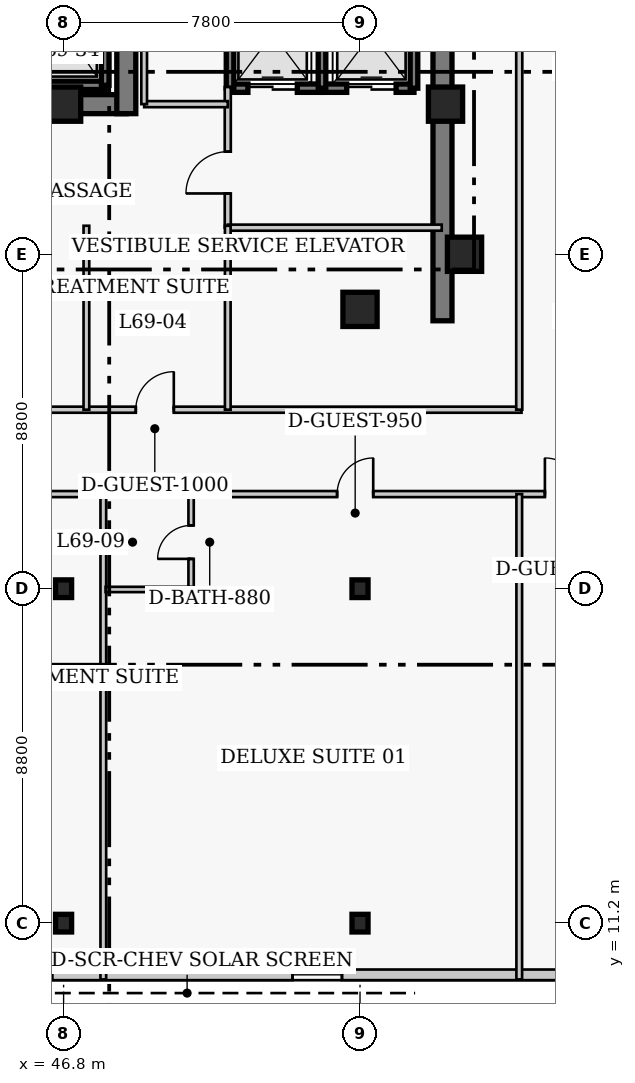
"""IFC4 building model, lengths in metres.
Left out: names, types, materials, properties, quantities, classifications, styles, units other than length and angle.
Written with IfcOpenShell. Run it as: python <this file> out.ifc"""

import sys

from ifc_helpers import new_model, si_unit, direction, frame, frame_2d, origin, origin_2d, place, context, subcontext, project, spatial, rectangle, i_section, extrude, element, fill, save


model = new_model("IFC4")
c1 = context("Model", 3, precision=1e-05, world=origin(), true_north=direction((0.0, 1.0)))
c2 = subcontext(c1, "Body", "Model", "MODEL_VIEW")
j1 = project(units=[si_unit("LENGTHUNIT", "METRE"), si_unit("PLANEANGLEUNIT", "RADIAN")], contexts=[c1])
p1 = place(None, origin())
s1 = spatial("IfcSite", under=j1, at=p1, CompositionType="ELEMENT")
p2 = place(p1, origin())
s2 = spatial("IfcBuilding", under=s1, at=p2, CompositionType="ELEMENT")
p3 = place(p2, frame((0.0, 0.0, 277.4)))
s3 = spatial("IfcBuildingStorey", under=s2, at=p3, CompositionType="ELEMENT", Elevation=277.4)
p4 = place(p3, frame((56.77, 27.05, 0.0), z_axis=(0.0, 0.0, 1.0), x_axis=(0.0, 1.0, 0.0)))
e1 = element("IfcWall", 1, at=p4, inside=s3, PredefinedType="SHEAR", context=c2, shape_type="SweptSolid", body=[
    extrude(rectangle(XDim=13.52, YDim=0.5, at=frame_2d((6.76, 0.0))), origin(), (0.0, 0.0, 1.0), 4.0),
])
p5 = place(p3, frame((45.81, 32.75, 0.0), z_axis=(0.0, 0.0, 1.0), x_axis=(1.0, 0.0, 0.0)))
e2 = element("IfcWall", 2, at=p5, inside=s3, PredefinedType="SHEAR", context=c2, shape_type="SweptSolid", body=[
    extrude(rectangle(XDim=2.64, YDim=0.5, at=frame_2d((1.32, 0.0))), origin(), (0.0, 0.0, 1.0), 4.0),
])
p6 = place(p3, frame((48.45, 32.5, 0.0), z_axis=(0.0, 0.0, 1.0), x_axis=(0.0, 1.0, 0.0)))
e3 = element("IfcWall", 3, at=p6, inside=s3, PredefinedType="SHEAR", context=c2, shape_type="SweptSolid", body=[
    extrude(rectangle(XDim=7.82, YDim=0.5, at=frame_2d((3.91, 0.0))), origin(), (0.0, 0.0, 1.0), 4.0),
])
p7 = place(p6, frame((5.7, 0.0, 0.0)))
e4 = element("IfcOpeningElement", 4, at=p7, cuts=e3, PredefinedType="OPENING", context=c2, shape_type="SweptSolid", body=[
    extrude(rectangle(XDim=1.1, YDim=2.15, at=frame_2d((0.55, 1.075))), frame((0.0, 0.26, 0.0), z_axis=(0.0, -1.0, 0.0), x_axis=(1.0, 0.0, 0.0)), (0.0, 0.0, 1.0), 0.52),
])
for number, where, z_axis, x_axis in (
    (5, (46.8, 11.2, 0.0), (0.0, 0.0, 1.0), (1.0, 0.0, 0.0)),
    (6, (46.8, 20.0, 0.0), (0.0, 0.0, 1.0), (1.0, 0.0, 0.0)),
    (7, (54.6, 11.2, 0.0), (0.0, 0.0, 1.0), (1.0, 0.0, 0.0)),
    (8, (54.6, 20.0, 0.0), (0.0, 0.0, 1.0), (1.0, 0.0, 0.0)),
):
    element("IfcColumn", number, at=place(p3, frame(where, z_axis=z_axis, x_axis=x_axis)), inside=s3, PredefinedType="COLUMN", context=c2, shape_type="SweptSolid", body=[
        extrude(i_section(OverallWidth=0.422, OverallDepth=0.465, WebThickness=0.045, FlangeThickness=0.073, FilletRadius=0.017, at=origin_2d()), origin(), (0.0, 0.0, 1.0), 4.0),
    ])
for number, where, z_axis, x_axis in (
    (9, (57.35, 28.8, 0.0), (0.0, 0.0, 1.0), (1.0, 0.0, 0.0)),
    (10, (46.8, 32.75, 0.0), (0.0, 0.0, 1.0), (1.0, 0.0, 0.0)),
    (11, (54.6, 27.35, 0.0), (0.0, 0.0, 1.0), (1.0, 0.0, 0.0)),
    (12, (56.85, 32.75, 0.0), (0.0, 0.0, 1.0), (1.0, 0.0, 0.0)),
):
    element("IfcColumn", number, at=place(p3, frame(where, z_axis=z_axis, x_axis=x_axis)), inside=s3, PredefinedType="COLUMN", context=c2, shape_type="SweptSolid", body=[
        extrude(rectangle(XDim=0.9, YDim=0.9, at=origin_2d()), origin(), (0.0, 0.0, 1.0), 4.0),
    ])
p8 = place(p3, frame((41.71, 9.84, 0.0), z_axis=(0.0, 0.0, 1.0), x_axis=(1.0, 0.0, 0.0)))
e13 = element("IfcWall", 13, at=p8, inside=s3, PredefinedType="SOLIDWALL", context=c2, shape_type="SweptSolid", body=[
    extrude(rectangle(XDim=24.83, YDim=0.28, at=frame_2d((12.415, 0.0))), origin(), (0.0, 0.0, 1.0), 3.76),
])
p9 = place(p8, frame((3.488, 0.0, 0.85)))
e14 = element("IfcOpeningElement", 14, at=p9, cuts=e13, PredefinedType="OPENING", context=c2, shape_type="SweptSolid", body=[
    extrude(rectangle(XDim=1.3, YDim=1.7, at=frame_2d((0.65, 0.85))), frame((0.0, 0.15, 0.0), z_axis=(0.0, -1.0, 0.0), x_axis=(1.0, 0.0, 0.0)), (0.0, 0.0, 1.0), 0.3),
])
p10 = place(p8, frame((11.115, 0.0, 0.85)))
e15 = element("IfcOpeningElement", 15, at=p10, cuts=e13, PredefinedType="OPENING", context=c2, shape_type="SweptSolid", body=[
    extrude(rectangle(XDim=1.3, YDim=1.7, at=frame_2d((0.65, 0.85))), frame((0.0, 0.15, 0.0), z_axis=(0.0, -1.0, 0.0), x_axis=(1.0, 0.0, 0.0)), (0.0, 0.0, 1.0), 0.3),
])
p11 = place(p8, frame((18.892, 0.0, 0.85)))
e16 = element("IfcOpeningElement", 16, at=p11, cuts=e13, PredefinedType="OPENING", context=c2, shape_type="SweptSolid", body=[
    extrude(rectangle(XDim=1.3, YDim=1.7, at=frame_2d((0.65, 0.85))), frame((0.0, 0.15, 0.0), z_axis=(0.0, -1.0, 0.0), x_axis=(1.0, 0.0, 0.0)), (0.0, 0.0, 1.0), 0.3),
])
p12 = place(p3, frame((51.18, 33.17, 0.0), z_axis=(0.0, 0.0, 1.0), x_axis=(1.0, 0.0, 0.0)))
e17 = element("IfcWall", 17, at=p12, inside=s3, PredefinedType="SHEAR", context=c2, shape_type="SweptSolid", body=[
    extrude(rectangle(XDim=2.42, YDim=0.22, at=frame_2d((1.21, 0.0))), origin(), (0.0, 0.0, 1.0), 4.0),
])
p13 = place(p12, frame((0.47, 0.0, 0.0)))
e18 = element("IfcOpeningElement", 18, at=p13, cuts=e17, PredefinedType="OPENING", context=c2, shape_type="SweptSolid", body=[
    extrude(rectangle(XDim=1.3, YDim=2.15, at=frame_2d((0.65, 1.075))), frame((0.0, 0.12, 0.0), z_axis=(0.0, -1.0, 0.0), x_axis=(1.0, 0.0, 0.0)), (0.0, 0.0, 1.0), 0.24),
])
p14 = place(p3, frame((51.18, 33.17, 0.0), z_axis=(0.0, 0.0, 1.0), x_axis=(0.0, 1.0, 0.0)))
e19 = element("IfcWall", 19, at=p14, inside=s3, PredefinedType="SHEAR", context=c2, shape_type="SweptSolid", body=[
    extrude(rectangle(XDim=2.86, YDim=0.2, at=frame_2d((1.43, 0.0))), origin(), (0.0, 0.0, 1.0), 4.0),
])
p15 = place(p3, frame((53.6, 33.17, 0.0), z_axis=(0.0, 0.0, 1.0), x_axis=(1.0, 0.0, 0.0)))
e20 = element("IfcWall", 20, at=p15, inside=s3, PredefinedType="SHEAR", context=c2, shape_type="SweptSolid", body=[
    extrude(rectangle(XDim=2.42, YDim=0.22, at=frame_2d((1.21, 0.0))), origin(), (0.0, 0.0, 1.0), 4.0),
])
p16 = place(p15, frame((0.65, 0.0, 0.0)))
e21 = element("IfcOpeningElement", 21, at=p16, cuts=e20, PredefinedType="OPENING", context=c2, shape_type="SweptSolid", body=[
    extrude(rectangle(XDim=1.3, YDim=2.15, at=frame_2d((0.65, 1.075))), frame((0.0, 0.12, 0.0), z_axis=(0.0, -1.0, 0.0), x_axis=(1.0, 0.0, 0.0)), (0.0, 0.0, 1.0), 0.24),
])
for number, where, z_axis, x_axis in (
    (22, (53.6, 33.17, 0.0), (0.0, 0.0, 1.0), (0.0, 1.0, 0.0)),
    (23, (56.02, 33.17, 0.0), (0.0, 0.0, 1.0), (0.0, 1.0, 0.0)),
):
    element("IfcWall", number, at=place(p3, frame(where, z_axis=z_axis, x_axis=x_axis)), inside=s3, PredefinedType="SHEAR", context=c2, shape_type="SweptSolid", body=[
        extrude(rectangle(XDim=2.86, YDim=0.2, at=frame_2d((1.43, 0.0))), origin(), (0.0, 0.0, 1.0), 4.0),
    ])
p17 = place(p3, frame((45.805, 33.245, 0.0), z_axis=(0.0, 0.0, 1.0), x_axis=(1.0, 0.0, 0.0)))
e24 = element("IfcWall", 24, at=p17, inside=s3, PredefinedType="SHEAR", context=c2, shape_type="SweptSolid", body=[
    extrude(rectangle(XDim=2.09, YDim=0.22, at=frame_2d((1.045, 0.0))), origin(), (0.0, 0.0, 1.0), 4.0),
])
p18 = place(p3, frame((47.895, 33.245, 0.0), z_axis=(0.0, 0.0, 1.0), x_axis=(0.0, 1.0, 0.0)))
e25 = element("IfcWall", 25, at=p18, inside=s3, PredefinedType="SHEAR", context=c2, shape_type="SweptSolid", body=[
    extrude(rectangle(XDim=2.91, YDim=0.2, at=frame_2d((1.455, 0.0))), origin(), (0.0, 0.0, 1.0), 4.0),
])
p19 = place(p3, frame((51.12, 29.5, 0.0), z_axis=(0.0, 0.0, 1.0), x_axis=(0.0, 1.0, 0.0)))
e26 = element("IfcWall", 26, at=p19, inside=s3, PredefinedType="PARTITIONING", context=c2, shape_type="SweptSolid", body=[
    extrude(rectangle(XDim=3.7, YDim=0.16, at=frame_2d((1.85, 0.0))), origin(), (0.0, 0.0, 1.0), 3.76),
])
p20 = place(p19, frame((0.9, 0.0, 0.0)))
e27 = element("IfcOpeningElement", 27, at=p20, cuts=e26, PredefinedType="OPENING", context=c2, shape_type="SweptSolid", body=[
    extrude(rectangle(XDim=1.1, YDim=2.15, at=frame_2d((0.55, 1.075))), frame((0.0, 0.09, 0.0), z_axis=(0.0, -1.0, 0.0), x_axis=(1.0, 0.0, 0.0)), (0.0, 0.0, 1.0), 0.18),
])
p21 = place(p3, frame((51.12, 29.5, 0.0), z_axis=(0.0, 0.0, 1.0), x_axis=(1.0, 0.0, 0.0)))
e28 = element("IfcWall", 28, at=p21, inside=s3, PredefinedType="PARTITIONING", context=c2, shape_type="SweptSolid", body=[
    extrude(rectangle(XDim=5.63, YDim=0.16, at=frame_2d((2.815, 0.0))), origin(), (0.0, 0.0, 1.0), 3.76),
])
p22 = place(p3, frame((48.92, 32.75, 0.0), z_axis=(0.0, 0.0, 1.0), x_axis=(1.0, 0.0, 0.0)))
e29 = element("IfcWall", 29, at=p22, inside=s3, PredefinedType="PARTITIONING", context=c2, shape_type="SweptSolid", body=[
    extrude(rectangle(XDim=2.2, YDim=0.16, at=frame_2d((1.1, 0.0))), origin(), (0.0, 0.0, 1.0), 3.76),
])
p23 = place(p3, frame((48.92, 32.75, 0.0), z_axis=(0.0, 0.0, 1.0), x_axis=(0.0, 1.0, 0.0)))
e30 = element("IfcWall", 30, at=p23, inside=s3, PredefinedType="PARTITIONING", context=c2, shape_type="SweptSolid", body=[
    extrude(rectangle(XDim=3.62, YDim=0.15, at=frame_2d((1.81, 0.0))), origin(), (0.0, 0.0, 1.0), 3.76),
])
p24 = place(p3, frame((35.85, 24.71, 0.0), z_axis=(0.0, 0.0, 1.0), x_axis=(1.0, 0.0, 0.0)))
e31 = element("IfcWall", 31, at=p24, inside=s3, PredefinedType="PARTITIONING", context=c2, shape_type="SweptSolid", body=[
    extrude(rectangle(XDim=23.0, YDim=0.16, at=frame_2d((11.5, 0.0))), origin(), (0.0, 0.0, 1.0), 3.76),
])
p25 = place(p24, frame((5.35, 0.0, 0.0)))
e32 = element("IfcOpeningElement", 32, at=p25, cuts=e31, PredefinedType="OPENING", context=c2, shape_type="SweptSolid", body=[
    extrude(rectangle(XDim=1.0, YDim=2.15, at=frame_2d((0.5, 1.075))), frame((0.0, 0.09, 0.0), z_axis=(0.0, -1.0, 0.0), x_axis=(1.0, 0.0, 0.0)), (0.0, 0.0, 1.0), 0.18),
])
p26 = place(p24, frame((12.85, 0.0, 0.0)))
e33 = element("IfcOpeningElement", 33, at=p26, cuts=e31, PredefinedType="OPENING", context=c2, shape_type="SweptSolid", body=[
    extrude(rectangle(XDim=1.0, YDim=2.15, at=frame_2d((0.5, 1.075))), frame((0.0, 0.09, 0.0), z_axis=(0.0, -1.0, 0.0), x_axis=(1.0, 0.0, 0.0)), (0.0, 0.0, 1.0), 0.18),
])
p27 = place(p3, frame((35.8, 22.49, 0.0), z_axis=(0.0, 0.0, 1.0), x_axis=(1.0, 0.0, 0.0)))
e34 = element("IfcWall", 34, at=p27, inside=s3, PredefinedType="PARTITIONING", context=c2, shape_type="SweptSolid", body=[
    extrude(rectangle(XDim=25.21, YDim=0.16, at=frame_2d((12.605, 0.0))), origin(), (0.0, 0.0, 1.0), 3.76),
])
p28 = place(p27, frame((5.522, 0.0, 0.0)))
e35 = element("IfcOpeningElement", 35, at=p28, cuts=e34, PredefinedType="OPENING", context=c2, shape_type="SweptSolid", body=[
    extrude(rectangle(XDim=1.0, YDim=2.15, at=frame_2d((0.5, 1.075))), frame((0.0, 0.09, 0.0), z_axis=(0.0, -1.0, 0.0), x_axis=(1.0, 0.0, 0.0)), (0.0, 0.0, 1.0), 0.18),
])
p29 = place(p27, frame((18.198, 0.0, 0.0)))
e36 = element("IfcOpeningElement", 36, at=p29, cuts=e34, PredefinedType="OPENING", context=c2, shape_type="SweptSolid", body=[
    extrude(rectangle(XDim=0.95, YDim=2.1, at=frame_2d((0.475, 1.05))), frame((0.0, 0.09, 0.0), z_axis=(0.0, -1.0, 0.0), x_axis=(1.0, 0.0, 0.0)), (0.0, 0.0, 1.0), 0.18),
])
p30 = place(p27, frame((23.665, 0.0, 0.0)))
e37 = element("IfcOpeningElement", 37, at=p30, cuts=e34, PredefinedType="OPENING", context=c2, shape_type="SweptSolid", body=[
    extrude(rectangle(XDim=0.95, YDim=2.1, at=frame_2d((0.475, 1.05))), frame((0.0, 0.09, 0.0), z_axis=(0.0, -1.0, 0.0), x_axis=(1.0, 0.0, 0.0)), (0.0, 0.0, 1.0), 0.18),
])
p31 = place(p3, frame((58.79, 24.71, 0.0), z_axis=(0.0, 0.0, 1.0), x_axis=(0.0, 1.0, 0.0)))
e38 = element("IfcWall", 38, at=p31, inside=s3, PredefinedType="PARTITIONING", context=c2, shape_type="SweptSolid", body=[
    extrude(rectangle(XDim=15.94, YDim=0.16, at=frame_2d((7.97, 0.0))), origin(), (0.0, 0.0, 1.0), 3.76),
])
for number, where, z_axis, x_axis in (
    (39, (47.4, 24.71, 0.0), (0.0, 0.0, 1.0), (0.0, 1.0, 0.0)),
    (40, (51.12, 24.71, 0.0), (0.0, 0.0, 1.0), (0.0, 1.0, 0.0)),
):
    element("IfcWall", number, at=place(p3, frame(where, z_axis=z_axis, x_axis=x_axis)), inside=s3, PredefinedType="PARTITIONING", context=c2, shape_type="SweptSolid", body=[
        extrude(rectangle(XDim=4.84, YDim=0.15, at=frame_2d((2.42, 0.0))), origin(), (0.0, 0.0, 1.0), 3.76),
    ])
p32 = place(p3, frame((47.845, 9.72, 0.0), z_axis=(0.0, 0.0, 1.0), x_axis=(0.0, 1.0, 0.0)))
e41 = element("IfcWall", 41, at=p32, inside=s3, PredefinedType="PARTITIONING", context=c2, shape_type="SweptSolid", body=[
    extrude(rectangle(XDim=12.77, YDim=0.15, at=frame_2d((6.385, 0.0))), origin(), (0.0, 0.0, 1.0), 3.76),
])
p33 = place(p3, frame((50.155, 19.98, 0.0), z_axis=(0.0, 0.0, 1.0), x_axis=(0.0, 1.0, 0.0)))
e42 = element("IfcWall", 42, at=p33, inside=s3, PredefinedType="PLUMBINGWALL", context=c2, shape_type="SweptSolid", body=[
    extrude(rectangle(XDim=2.49, YDim=0.14, at=frame_2d((1.245, 0.0))), origin(), (0.0, 0.0, 1.0), 3.76),
])
p34 = place(p33, frame((0.805, 0.0, 0.0)))
e43 = element("IfcOpeningElement", 43, at=p34, cuts=e42, PredefinedType="OPENING", context=c2, shape_type="SweptSolid", body=[
    extrude(rectangle(XDim=0.88, YDim=2.05, at=frame_2d((0.44, 1.025))), frame((0.0, 0.08, 0.0), z_axis=(0.0, -1.0, 0.0), x_axis=(1.0, 0.0, 0.0)), (0.0, 0.0, 1.0), 0.16),
])
p35 = place(p3, frame((47.905, 19.98, 0.0), z_axis=(0.0, 0.0, 1.0), x_axis=(1.0, 0.0, 0.0)))
e44 = element("IfcWall", 44, at=p35, inside=s3, PredefinedType="PLUMBINGWALL", context=c2, shape_type="SweptSolid", body=[
    extrude(rectangle(XDim=2.25, YDim=0.14, at=frame_2d((1.125, 0.0))), origin(), (0.0, 0.0, 1.0), 3.064),
])
p36 = place(p3, frame((58.79, 9.72, 0.0), z_axis=(0.0, 0.0, 1.0), x_axis=(0.0, 1.0, 0.0)))
e45 = element("IfcWall", 45, at=p36, inside=s3, PredefinedType="PARTITIONING", context=c2, shape_type="SweptSolid", body=[
    extrude(rectangle(XDim=12.77, YDim=0.15, at=frame_2d((6.385, 0.0))), origin(), (0.0, 0.0, 1.0), 3.76),
])
p37 = place(p10, origin())
e46 = element("IfcWindow", 46, at=p37, inside=s3, PartitioningType="SINGLE_PANEL", PredefinedType="WINDOW", context=c2, shape_type="SweptSolid", body=[
    extrude(rectangle(XDim=1.3, YDim=1.7, at=frame_2d((0.65, 0.85))), frame((0.0, 0.03, 0.0), z_axis=(0.0, -1.0, 0.0), x_axis=(1.0, 0.0, 0.0)), (0.0, 0.0, 1.0), 0.06),
])
fill(e15, e46)
p38 = place(p13, origin())
e47 = element("IfcDoor", 47, at=p38, inside=s3, OperationType="DOUBLE_DOOR_SLIDING", PredefinedType="DOOR", context=c2, shape_type="SweptSolid", body=[
    extrude(rectangle(XDim=1.3, YDim=2.15, at=frame_2d((0.65, 1.075))), frame((0.0, 0.025, 0.0), z_axis=(0.0, -1.0, 0.0), x_axis=(1.0, 0.0, 0.0)), (0.0, 0.0, 1.0), 0.05),
])
fill(e18, e47)
p39 = place(p16, origin())
e48 = element("IfcDoor", 48, at=p39, inside=s3, OperationType="DOUBLE_DOOR_SLIDING", PredefinedType="DOOR", context=c2, shape_type="SweptSolid", body=[
    extrude(rectangle(XDim=1.3, YDim=2.15, at=frame_2d((0.65, 1.075))), frame((0.0, 0.025, 0.0), z_axis=(0.0, -1.0, 0.0), x_axis=(1.0, 0.0, 0.0)), (0.0, 0.0, 1.0), 0.05),
])
fill(e21, e48)
p40 = place(p20, origin())
e49 = element("IfcDoor", 49, at=p40, inside=s3, OperationType="SINGLE_SWING_LEFT", PredefinedType="DOOR", context=c2, shape_type="SweptSolid", body=[
    extrude(rectangle(XDim=1.1, YDim=2.15, at=frame_2d((0.55, 1.075))), frame((0.0, 0.025, 0.0), z_axis=(0.0, -1.0, 0.0), x_axis=(1.0, 0.0, 0.0)), (0.0, 0.0, 1.0), 0.05),
])
fill(e27, e49)
p41 = place(p26, origin())
e50 = element("IfcDoor", 50, at=p41, inside=s3, OperationType="SINGLE_SWING_RIGHT", PredefinedType="DOOR", context=c2, shape_type="SweptSolid", body=[
    extrude(rectangle(XDim=1.0, YDim=2.15, at=frame_2d((0.5, 1.075))), frame((0.0, 0.025, 0.0), z_axis=(0.0, -1.0, 0.0), x_axis=(1.0, 0.0, 0.0)), (0.0, 0.0, 1.0), 0.05),
])
fill(e33, e50)
p42 = place(p34, origin())
e51 = element("IfcDoor", 51, at=p42, inside=s3, OperationType="SINGLE_SWING_LEFT", PredefinedType="DOOR", context=c2, shape_type="SweptSolid", body=[
    extrude(rectangle(XDim=0.88, YDim=2.05, at=frame_2d((0.44, 1.025))), frame((0.0, 0.025, 0.0), z_axis=(0.0, -1.0, 0.0), x_axis=(1.0, 0.0, 0.0)), (0.0, 0.0, 1.0), 0.05),
])
fill(e43, e51)
p43 = place(p29, origin())
e52 = element("IfcDoor", 52, at=p43, inside=s3, OperationType="SINGLE_SWING_RIGHT", PredefinedType="DOOR", context=c2, shape_type="SweptSolid", body=[
    extrude(rectangle(XDim=0.95, YDim=2.1, at=frame_2d((0.475, 1.05))), frame((0.0, 0.025, 0.0), z_axis=(0.0, -1.0, 0.0), x_axis=(1.0, 0.0, 0.0)), (0.0, 0.0, 1.0), 0.05),
])
fill(e36, e52)
p44 = place(p30, origin())
e53 = element("IfcDoor", 53, at=p44, inside=s3, OperationType="SINGLE_SWING_LEFT", PredefinedType="DOOR", context=c2, shape_type="SweptSolid", body=[
    extrude(rectangle(XDim=0.95, YDim=2.1, at=frame_2d((0.475, 1.05))), frame((0.0, 0.025, 0.0), z_axis=(0.0, -1.0, 0.0), x_axis=(1.0, 0.0, 0.0)), (0.0, 0.0, 1.0), 0.05),
])
fill(e37, e53)
save(model, sys.argv[1])
